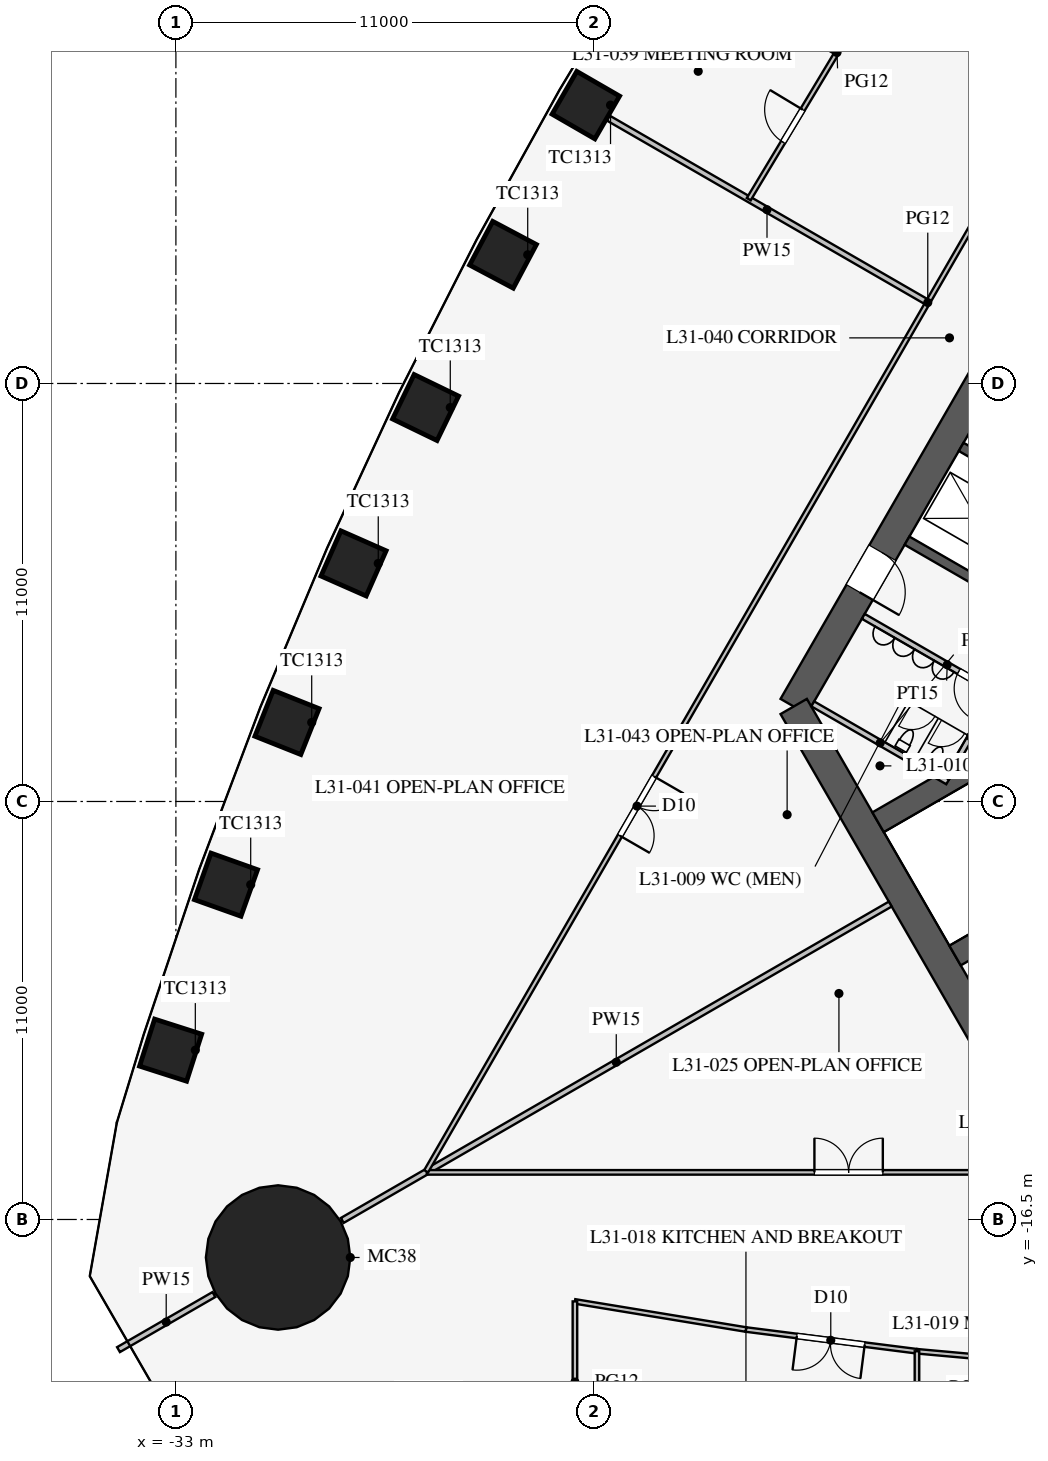
"""IFC4 building model, lengths in metres.
Left out: names, types, materials, properties, quantities, classifications, styles, units other than length and angle.
Written with IfcOpenShell. Run it as: python <this file> out.ifc"""

import sys

from ifc_helpers import new_model, si_unit, direction, frame, frame_2d, origin, origin_2d, place, context, subcontext, project, spatial, rectangle, circle, extrude, element, fill, save


model = new_model("IFC4")
c1 = context("Model", 3, precision=1e-05, world=origin(), true_north=direction((0.0, 1.0)))
c2 = subcontext(c1, "Body", "Model", "MODEL_VIEW")
j1 = project(units=[si_unit("LENGTHUNIT", "METRE"), si_unit("PLANEANGLEUNIT", "RADIAN")], contexts=[c1])
p1 = place(None, origin())
s1 = spatial("IfcSite", under=j1, at=p1, CompositionType="ELEMENT")
p2 = place(p1, origin())
s2 = spatial("IfcBuilding", under=s1, at=p2, CompositionType="ELEMENT")
p3 = place(p2, frame((0.0, 0.0, 136.7)))
s3 = spatial("IfcBuildingStorey", under=s2, at=p3, CompositionType="ELEMENT", Elevation=136.7)
for number, where, z_axis, x_axis in (
    (1, (-22.213, 12.825, 0.0), (0.0, 0.0, 1.0), (-0.5, -0.866, 0.0)),
    (2, (-24.393, 8.887, 0.0), (0.0, 0.0, 1.0), (-0.468, -0.883, 0.0)),
    (3, (-26.43, 4.867, 0.0), (0.0, 0.0, 1.0), (-0.436, -0.9, 0.0)),
    (4, (-28.325, 0.765, 0.0), (0.0, 0.0, 1.0), (-0.403, -0.915, 0.0)),
    (5, (-30.077, -3.42, 0.0), (0.0, 0.0, 1.0), (-0.37, -0.929, 0.0)),
    (6, (-31.682, -7.689, 0.0), (0.0, 0.0, 1.0), (-0.336, -0.942, 0.0)),
    (7, (-33.139, -12.044, 0.0), (0.0, 0.0, 1.0), (-0.305, -0.952, 0.0)),
):
    element("IfcColumn", number, at=place(p3, frame(where, z_axis=z_axis, x_axis=x_axis)), inside=s3, PredefinedType="COLUMN", context=c2, shape_type="SweptSolid", body=[
        extrude(rectangle(XDim=1.3, YDim=1.3, at=origin_2d()), origin(), (0.0, 0.0, 1.0), 4.2),
    ])
p4 = place(p3, frame((-30.311, -17.5, 0.0), z_axis=(0.0, 0.0, 1.0), x_axis=(1.0, 0.0, 0.0)))
e8 = element("IfcColumn", 8, at=p4, inside=s3, PredefinedType="COLUMN", context=c2, shape_type="SweptSolid", body=[
    extrude(circle(Radius=1.9, at=origin_2d()), origin(), (0.0, 0.0, 1.0), 4.2),
])
p5 = place(p3, frame((-5.773, 16.0, 0.0), z_axis=(0.0, 0.0, 1.0), x_axis=(-0.500002442456, -0.866023993627, 0.0)))
e9 = element("IfcWall", 9, at=p5, inside=s3, PredefinedType="SHEAR", context=c2, shape_type="SweptSolid", body=[
    extrude(rectangle(XDim=21.939, YDim=0.8, at=frame_2d((10.97, 0.0))), origin(), (0.0, 0.0, 1.0), 4.2),
])
p6 = place(p5, frame((17.27, 0.0, 0.0)))
e10 = element("IfcOpeningElement", 10, at=p6, cuts=e9, PredefinedType="OPENING", context=c2, shape_type="SweptSolid", body=[
    extrude(rectangle(XDim=1.2, YDim=2.1, at=frame_2d((0.6, 1.05))), frame((0.0, 0.41, 0.0), z_axis=(0.0, -1.0, 0.0), x_axis=(1.0, 0.0, 0.0)), (0.0, 0.0, 1.0), 0.82),
])
p7 = place(p5, frame((3.47, 0.0, 0.0)))
e11 = element("IfcOpeningElement", 11, at=p7, cuts=e9, PredefinedType="OPENING", context=c2, shape_type="SweptSolid", body=[
    extrude(rectangle(XDim=1.2, YDim=2.1, at=frame_2d((0.6, 1.05))), frame((0.0, 0.41, 0.0), z_axis=(0.0, -1.0, 0.0), x_axis=(1.0, 0.0, 0.0)), (0.0, 0.0, 1.0), 0.82),
])
p8 = place(p3, frame((-16.743, -3.0, 0.0), z_axis=(0.0, 0.0, 1.0), x_axis=(0.499995765644, -0.866027848477, 0.0)))
e12 = element("IfcWall", 12, at=p8, inside=s3, PredefinedType="SHEAR", context=c2, shape_type="SweptSolid", body=[
    extrude(rectangle(XDim=11.547, YDim=0.8, at=frame_2d((5.773, 0.0))), origin(), (0.0, 0.0, 1.0), 4.2),
])
for number, where, z_axis, x_axis in (
    (13, (-10.107, 2.544, 0.0), (0.0, 0.0, 1.0), (-0.866, 0.5, 0.0)),
    (14, (-11.532, 0.076, 0.0), (0.0, 0.0, 1.0), (-0.866, 0.5, 0.0)),
):
    element("IfcWall", number, at=place(p3, frame(where, z_axis=z_axis, x_axis=x_axis)), inside=s3, PredefinedType="SHEAR", context=c2, shape_type="SweptSolid", body=[
        extrude(rectangle(XDim=2.575, YDim=0.25, at=frame_2d((1.288, 0.0))), origin(), (0.0, 0.0, 1.0), 4.2),
    ])
for number, where, z_axis, x_axis in (
    (15, (-6.663, -1.509, 0.0), (0.0, 0.0, 1.0), (-0.866, -0.5, 0.0)),
    (16, (-4.638, -5.016, 0.0), (0.0, 0.0, 1.0), (-0.866, -0.5, 0.0)),
):
    element("IfcWall", number, at=place(p3, frame(where, z_axis=z_axis, x_axis=x_axis)), inside=s3, PredefinedType="SHEAR", context=c2, shape_type="SweptSolid", body=[
        extrude(rectangle(XDim=9.075, YDim=0.6, at=frame_2d((4.538, 0.0))), origin(), (0.0, 0.0, 1.0), 4.2),
    ])
p9 = place(p3, frame((-10.495, -3.178, 0.0), z_axis=(0.0, 0.0, 1.0), x_axis=(-0.86602216432, 0.500005610874, 0.0)))
e17 = element("IfcWall", 17, at=p9, inside=s3, PredefinedType="PARTITIONING", context=c2, shape_type="SweptSolid", body=[
    extrude(rectangle(XDim=5.1, YDim=0.15, at=frame_2d((2.55, 0.0))), origin(), (0.0, 0.0, 1.0), 4.0),
])
p10 = place(p9, frame((1.3, 0.0, 0.0)))
e18 = element("IfcOpeningElement", 18, at=p10, cuts=e17, PredefinedType="OPENING", context=c2, shape_type="SweptSolid", body=[
    extrude(rectangle(XDim=0.9, YDim=2.1, at=frame_2d((0.45, 1.05))), frame((0.0, 0.085, 0.0), z_axis=(0.0, -1.0, 0.0), x_axis=(1.0, 0.0, 0.0)), (0.0, 0.0, 1.0), 0.17),
])
p11 = place(p3, frame((-12.691, -4.982, 0.0), z_axis=(0.0, 0.0, 1.0), x_axis=(-0.8660249478, 0.500000789788, 0.0)))
e19 = element("IfcWall", 19, at=p11, inside=s3, PredefinedType="PARTITIONING", context=c2, shape_type="SweptSolid", body=[
    extrude(rectangle(XDim=4.1, YDim=0.15, at=frame_2d((2.05, 0.0))), origin(), (0.0, 0.0, 1.0), 4.0),
])
p12 = place(p3, frame((-11.464, -2.706, 0.0), z_axis=(0.0, 0.0, 1.0), x_axis=(-0.50001992892, -0.866013897511, 0.0)))
e20 = element("IfcWall", 20, at=p12, inside=s3, PredefinedType="PARTITIONING", context=c2, shape_type="SweptSolid", body=[
    extrude(rectangle(XDim=2.51, YDim=0.15, at=frame_2d((1.255, 0.0))), origin(), (0.0, 0.0, 1.0), 4.0),
])
p13 = place(p3, frame((-14.203, -8.2, 0.0), z_axis=(0.0, 0.0, 1.0), x_axis=(-0.866024668836, -0.500001272966, 0.0)))
e21 = element("IfcWall", 21, at=p13, inside=s3, PredefinedType="PARTITIONING", context=c2, shape_type="SweptSolid", body=[
    extrude(rectangle(XDim=16.65, YDim=0.15, at=frame_2d((8.325, 0.0))), origin(), (0.0, 0.0, 1.0), 2.3),
])
p14 = place(p3, frame((-32.0, -18.475, 0.0), z_axis=(0.0, 0.0, 1.0), x_axis=(-0.866042548026, -0.499970304126, 0.0)))
e22 = element("IfcWall", 22, at=p14, inside=s3, PredefinedType="PARTITIONING", context=c2, shape_type="SweptSolid", body=[
    extrude(rectangle(XDim=2.899, YDim=0.15, at=frame_2d((1.45, 0.0))), origin(), (0.0, 0.0, 1.0), 2.3),
])
p15 = place(p3, frame((-26.398, -15.26, 0.0), z_axis=(0.0, 0.0, 1.0), x_axis=(1.0, 0.0, 0.0)))
e23 = element("IfcWall", 23, at=p15, inside=s3, PredefinedType="PARTITIONING", context=c2, shape_type="SweptSolid", body=[
    extrude(rectangle(XDim=52.796, YDim=0.12, at=frame_2d((26.398, 0.0))), origin(), (0.0, 0.0, 1.0), 2.9),
])
p16 = place(p15, frame((10.2, 0.0, 0.15)))
e24 = element("IfcOpeningElement", 24, at=p16, cuts=e23, PredefinedType="OPENING", context=c2, shape_type="SweptSolid", body=[
    extrude(rectangle(XDim=1.8, YDim=2.1, at=frame_2d((0.9, 1.05))), frame((0.0, 0.07, 0.0), z_axis=(0.0, -1.0, 0.0), x_axis=(1.0, 0.0, 0.0)), (0.0, 0.0, 1.0), 0.14),
])
p17 = place(p15, frame((40.8, 0.0, 0.15)))
e25 = element("IfcOpeningElement", 25, at=p17, cuts=e23, PredefinedType="OPENING", context=c2, shape_type="SweptSolid", body=[
    extrude(rectangle(XDim=1.8, YDim=2.1, at=frame_2d((0.9, 1.05))), frame((0.0, 0.07, 0.0), z_axis=(0.0, -1.0, 0.0), x_axis=(1.0, 0.0, 0.0)), (0.0, 0.0, 1.0), 0.14),
])
p18 = place(p3, frame((-13.5, -19.968, 0.0), z_axis=(0.0, 0.0, 1.0), x_axis=(0.995930325215, -0.090126507295, 0.0)))
e26 = element("IfcWall", 26, at=p18, inside=s3, PredefinedType="PARTITIONING", context=c2, shape_type="SweptSolid", body=[
    extrude(rectangle(XDim=4.518, YDim=0.12, at=frame_2d((2.259, 0.0))), origin(), (0.0, 0.0, 1.0), 2.9),
])
p19 = place(p18, frame((1.75, 0.0, 0.15)))
e27 = element("IfcOpeningElement", 27, at=p19, cuts=e26, PredefinedType="OPENING", context=c2, shape_type="SweptSolid", body=[
    extrude(rectangle(XDim=1.0, YDim=2.1, at=frame_2d((0.5, 1.05))), frame((0.0, 0.07, 0.0), z_axis=(0.0, -1.0, 0.0), x_axis=(1.0, 0.0, 0.0)), (0.0, 0.0, 1.0), 0.14),
])
p20 = place(p3, frame((-18.0, -19.396, 0.0), z_axis=(0.0, 0.0, 1.0), x_axis=(0.992010652594, -0.12615413247, 0.0)))
e28 = element("IfcWall", 28, at=p20, inside=s3, PredefinedType="PARTITIONING", context=c2, shape_type="SweptSolid", body=[
    extrude(rectangle(XDim=4.536, YDim=0.12, at=frame_2d((2.268, 0.0))), origin(), (0.0, 0.0, 1.0), 2.9),
])
p21 = place(p20, frame((1.35, 0.0, 0.15)))
e29 = element("IfcOpeningElement", 29, at=p21, cuts=e28, PredefinedType="OPENING", context=c2, shape_type="SweptSolid", body=[
    extrude(rectangle(XDim=1.8, YDim=2.1, at=frame_2d((0.9, 1.05))), frame((0.0, 0.07, 0.0), z_axis=(0.0, -1.0, 0.0), x_axis=(1.0, 0.0, 0.0)), (0.0, 0.0, 1.0), 0.14),
])
p22 = place(p3, frame((-22.5, -18.656, 0.0), z_axis=(0.0, 0.0, 1.0), x_axis=(0.986764681833, -0.162158757664, 0.0)))
e30 = element("IfcWall", 30, at=p22, inside=s3, PredefinedType="PARTITIONING", context=c2, shape_type="SweptSolid", body=[
    extrude(rectangle(XDim=4.56, YDim=0.12, at=frame_2d((2.28, 0.0))), origin(), (0.0, 0.0, 1.0), 2.9),
])
p23 = place(p3, frame((-13.5, -19.968, 0.0), z_axis=(0.0, 0.0, 1.0), x_axis=(0.0, -1.0, 0.0)))
e31 = element("IfcWall", 31, at=p23, inside=s3, PredefinedType="PARTITIONING", context=c2, shape_type="SweptSolid", body=[
    extrude(rectangle(XDim=4.261, YDim=0.12, at=frame_2d((2.131, 0.0))), origin(), (0.0, 0.0, 1.0), 2.9),
])
p24 = place(p3, frame((-22.5, -18.656, 0.0), z_axis=(0.0, 0.0, 1.0), x_axis=(0.0, -1.0, 0.0)))
e32 = element("IfcWall", 32, at=p24, inside=s3, PredefinedType="PARTITIONING", context=c2, shape_type="SweptSolid", body=[
    extrude(rectangle(XDim=4.245, YDim=0.12, at=frame_2d((2.123, 0.0))), origin(), (0.0, 0.0, 1.0), 2.9),
])
p25 = place(p3, frame((-13.268, 7.66, 0.0), z_axis=(0.0, 0.0, 1.0), x_axis=(-0.866015788683, 0.500016653474, 0.0)))
e33 = element("IfcWall", 33, at=p25, inside=s3, PredefinedType="PARTITIONING", context=c2, shape_type="SweptSolid", body=[
    extrude(rectangle(XDim=9.65, YDim=0.15, at=frame_2d((4.825, 0.0))), origin(), (0.0, 0.0, 1.0), 3.2),
])
p26 = place(p3, frame((-0.016, 30.491, 0.0), z_axis=(0.0, 0.0, 1.0), x_axis=(-0.50000091641, -0.866024874695, 0.0)))
e34 = element("IfcWall", 34, at=p26, inside=s3, PredefinedType="PARTITIONING", context=c2, shape_type="SweptSolid", body=[
    extrude(rectangle(XDim=52.796, YDim=0.12, at=frame_2d((26.398, 0.0))), origin(), (0.0, 0.0, 1.0), 2.9),
])
p27 = place(p26, frame((10.2, 0.0, 0.15)))
e35 = element("IfcOpeningElement", 35, at=p27, cuts=e34, PredefinedType="OPENING", context=c2, shape_type="SweptSolid", body=[
    extrude(rectangle(XDim=1.8, YDim=2.1, at=frame_2d((0.9, 1.05))), frame((0.0, 0.07, 0.0), z_axis=(0.0, -1.0, 0.0), x_axis=(1.0, 0.0, 0.0)), (0.0, 0.0, 1.0), 0.14),
])
p28 = place(p26, frame((40.8, 0.0, 0.15)))
e36 = element("IfcOpeningElement", 36, at=p28, cuts=e34, PredefinedType="OPENING", context=c2, shape_type="SweptSolid", body=[
    extrude(rectangle(XDim=1.8, YDim=2.1, at=frame_2d((0.9, 1.05))), frame((0.0, 0.07, 0.0), z_axis=(0.0, -1.0, 0.0), x_axis=(1.0, 0.0, 0.0)), (0.0, 0.0, 1.0), 0.14),
])
p29 = place(p3, frame((-15.606, 14.206, 0.0), z_axis=(0.0, 0.0, 1.0), x_axis=(-0.515548366618, -0.856860479703, 0.0)))
e37 = element("IfcWall", 37, at=p29, inside=s3, PredefinedType="PARTITIONING", context=c2, shape_type="SweptSolid", body=[
    extrude(rectangle(XDim=4.501, YDim=0.12, at=frame_2d((2.25, 0.0))), origin(), (0.0, 0.0, 1.0), 2.9),
])
p30 = place(p29, frame((1.75, 0.0, 0.15)))
e38 = element("IfcOpeningElement", 38, at=p30, cuts=e37, PredefinedType="OPENING", context=c2, shape_type="SweptSolid", body=[
    extrude(rectangle(XDim=1.0, YDim=2.1, at=frame_2d((0.5, 1.05))), frame((0.0, 0.07, 0.0), z_axis=(0.0, -1.0, 0.0), x_axis=(1.0, 0.0, 0.0)), (0.0, 0.0, 1.0), 0.14),
])
p31 = place(p3, frame((-13.145, 17.982, 0.0), z_axis=(0.0, 0.0, 1.0), x_axis=(-0.546069464151, -0.837739900161, 0.0)))
e39 = element("IfcWall", 39, at=p31, inside=s3, PredefinedType="PARTITIONING", context=c2, shape_type="SweptSolid", body=[
    extrude(rectangle(XDim=4.507, YDim=0.12, at=frame_2d((2.253, 0.0))), origin(), (0.0, 0.0, 1.0), 2.9),
])
p32 = place(p31, frame((1.75, 0.0, 0.15)))
e40 = element("IfcOpeningElement", 40, at=p32, cuts=e39, PredefinedType="OPENING", context=c2, shape_type="SweptSolid", body=[
    extrude(rectangle(XDim=1.0, YDim=2.1, at=frame_2d((0.5, 1.05))), frame((0.0, 0.07, 0.0), z_axis=(0.0, -1.0, 0.0), x_axis=(1.0, 0.0, 0.0)), (0.0, 0.0, 1.0), 0.14),
])
p33 = place(p3, frame((-15.606, 14.206, 0.0), z_axis=(0.0, 0.0, 1.0), x_axis=(-0.866020825576, 0.500007929605, 0.0)))
e41 = element("IfcWall", 41, at=p33, inside=s3, PredefinedType="PARTITIONING", context=c2, shape_type="SweptSolid", body=[
    extrude(rectangle(XDim=4.269, YDim=0.12, at=frame_2d((2.135, 0.0))), origin(), (0.0, 0.0, 1.0), 2.9),
])
p34 = place(p10, origin())
e42 = element("IfcDoor", 42, at=p34, inside=s3, OperationType="SINGLE_SWING_LEFT", PredefinedType="DOOR", context=c2, shape_type="SweptSolid", body=[
    extrude(rectangle(XDim=0.9, YDim=2.1, at=frame_2d((0.45, 1.05))), frame((0.0, 0.025, 0.0), z_axis=(0.0, -1.0, 0.0), x_axis=(1.0, 0.0, 0.0)), (0.0, 0.0, 1.0), 0.05),
])
fill(e18, e42)
p35 = place(p6, origin())
e43 = element("IfcDoor", 43, at=p35, inside=s3, OperationType="SINGLE_SWING_RIGHT", PredefinedType="DOOR", context=c2, shape_type="SweptSolid", body=[
    extrude(rectangle(XDim=1.2, YDim=2.1, at=frame_2d((0.6, 1.05))), frame((0.0, 0.025, 0.0), z_axis=(0.0, -1.0, 0.0), x_axis=(1.0, 0.0, 0.0)), (0.0, 0.0, 1.0), 0.05),
])
fill(e10, e43)
p36 = place(p21, frame((1.8, 0.0, 0.0), z_axis=(0.0, 0.0, 1.0), x_axis=(-1.0, 0.0, 0.0)))
e44 = element("IfcDoor", 44, at=p36, inside=s3, OperationType="DOUBLE_DOOR_SINGLE_SWING", PredefinedType="DOOR", context=c2, shape_type="SweptSolid", body=[
    extrude(rectangle(XDim=1.8, YDim=2.1, at=frame_2d((0.9, 1.05))), frame((0.0, 0.025, 0.0), z_axis=(0.0, -1.0, 0.0), x_axis=(1.0, 0.0, 0.0)), (0.0, 0.0, 1.0), 0.05),
])
fill(e29, e44)
p37 = place(p16, origin())
e45 = element("IfcDoor", 45, at=p37, inside=s3, OperationType="DOUBLE_DOOR_SINGLE_SWING", PredefinedType="DOOR", context=c2, shape_type="SweptSolid", body=[
    extrude(rectangle(XDim=1.8, YDim=2.1, at=frame_2d((0.9, 1.05))), frame((0.0, 0.025, 0.0), z_axis=(0.0, -1.0, 0.0), x_axis=(1.0, 0.0, 0.0)), (0.0, 0.0, 1.0), 0.05),
])
fill(e24, e45)
p38 = place(p30, frame((1.0, 0.0, 0.0), z_axis=(0.0, 0.0, 1.0), x_axis=(-1.0, 0.0, 0.0)))
e46 = element("IfcDoor", 46, at=p38, inside=s3, OperationType="SINGLE_SWING_RIGHT", PredefinedType="DOOR", context=c2, shape_type="SweptSolid", body=[
    extrude(rectangle(XDim=1.0, YDim=2.1, at=frame_2d((0.5, 1.05))), frame((0.0, 0.025, 0.0), z_axis=(0.0, -1.0, 0.0), x_axis=(1.0, 0.0, 0.0)), (0.0, 0.0, 1.0), 0.05),
])
fill(e38, e46)
p39 = place(p28, origin())
e47 = element("IfcDoor", 47, at=p39, inside=s3, OperationType="DOUBLE_DOOR_SINGLE_SWING", PredefinedType="DOOR", context=c2, shape_type="SweptSolid", body=[
    extrude(rectangle(XDim=1.8, YDim=2.1, at=frame_2d((0.9, 1.05))), frame((0.0, 0.025, 0.0), z_axis=(0.0, -1.0, 0.0), x_axis=(1.0, 0.0, 0.0)), (0.0, 0.0, 1.0), 0.05),
])
fill(e36, e47)
save(model, sys.argv[1])
